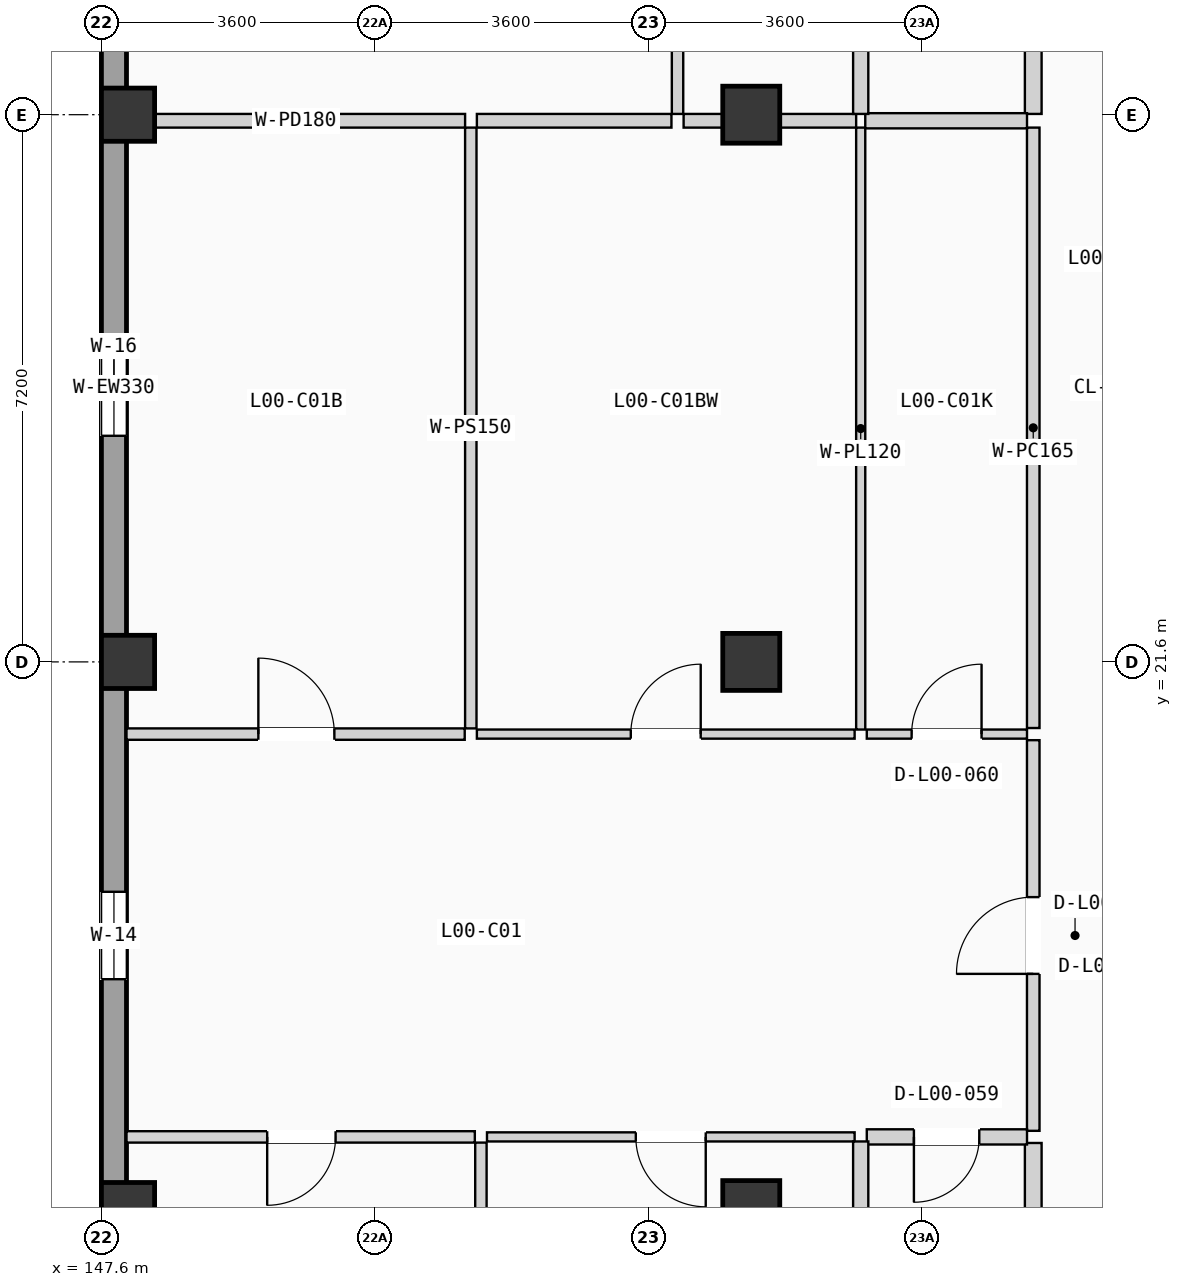
"""IFC4 building model, lengths in metres.
Left out: names, types, materials, properties, quantities, classifications, styles, units other than length and angle.
Written with IfcOpenShell. Run it as: python <this file> out.ifc"""

import sys

from ifc_helpers import new_model, si_unit, direction, frame, frame_2d, origin, origin_2d, place, context, subcontext, project, spatial, rectangle, extrude, element, fill, save


model = new_model("IFC4")
c1 = context("Model", 3, precision=1e-05, world=origin(), true_north=direction((0.0, 1.0)))
c2 = subcontext(c1, "Body", "Model", "MODEL_VIEW")
j1 = project(units=[si_unit("LENGTHUNIT", "METRE"), si_unit("PLANEANGLEUNIT", "RADIAN")], contexts=[c1])
p1 = place(None, origin())
s1 = spatial("IfcSite", under=j1, at=p1, CompositionType="ELEMENT")
p2 = place(p1, origin())
s2 = spatial("IfcBuilding", under=s1, at=p2, CompositionType="ELEMENT")
p3 = place(p2, origin())
s3 = spatial("IfcBuildingStorey", under=s2, at=p3, CompositionType="ELEMENT", Elevation=0.0)
for number, where, z_axis, x_axis in (
    (1, (147.95, 14.4, 0.0), (0.0, 0.0, 1.0), (1.0, 0.0, 0.0)),
    (2, (147.95, 21.6, 0.0), (0.0, 0.0, 1.0), (1.0, 0.0, 0.0)),
    (3, (147.95, 28.8, 0.0), (0.0, 0.0, 1.0), (1.0, 0.0, 0.0)),
):
    element("IfcColumn", number, at=place(p3, frame(where, z_axis=z_axis, x_axis=x_axis)), inside=s3, PredefinedType="COLUMN", context=c2, shape_type="SweptSolid", body=[
        extrude(rectangle(XDim=0.7, YDim=0.7, at=origin_2d()), origin(), (0.0, 0.0, 1.0), 4.9),
    ])
for number, where, z_axis, x_axis in (
    (4, (156.15, 14.4, 0.0), (0.0, 0.0, 1.0), (1.0, 0.0, 0.0)),
    (5, (156.15, 21.6, 0.0), (0.0, 0.0, 1.0), (1.0, 0.0, 0.0)),
    (6, (156.15, 28.8, 0.0), (0.0, 0.0, 1.0), (1.0, 0.0, 0.0)),
):
    element("IfcColumn", number, at=place(p3, frame(where, z_axis=z_axis, x_axis=x_axis)), inside=s3, PredefinedType="COLUMN", context=c2, shape_type="SweptSolid", body=[
        extrude(rectangle(XDim=0.75, YDim=0.75, at=origin_2d()), origin(), (0.0, 0.0, 1.0), 4.9),
    ])
p4 = place(p3, frame((147.765, 0.33, 0.0), z_axis=(0.0, 0.0, 1.0), x_axis=(0.0, 1.0, 0.0)))
e7 = element("IfcWall", 7, at=p4, inside=s3, PredefinedType="SOLIDWALL", context=c2, shape_type="SweptSolid", body=[
    extrude(rectangle(XDim=49.74, YDim=0.33, at=frame_2d((24.87, 0.0))), origin(), (0.0, 0.0, 1.0), 4.64),
])
p5 = place(p4, frame((17.095, 0.0, 0.9)))
e8 = element("IfcOpeningElement", 8, at=p5, cuts=e7, PredefinedType="OPENING", context=c2, shape_type="SweptSolid", body=[
    extrude(rectangle(XDim=1.15, YDim=1.65, at=frame_2d((0.575, 0.825))), frame((0.0, 0.175, 0.0), z_axis=(0.0, -1.0, 0.0), x_axis=(1.0, 0.0, 0.0)), (0.0, 0.0, 1.0), 0.35),
])
p6 = place(p4, frame((9.96, 0.0, 0.9)))
e9 = element("IfcOpeningElement", 9, at=p6, cuts=e7, PredefinedType="OPENING", context=c2, shape_type="SweptSolid", body=[
    extrude(rectangle(XDim=1.15, YDim=1.8, at=frame_2d((0.575, 0.9))), frame((0.0, 0.175, 0.0), z_axis=(0.0, -1.0, 0.0), x_axis=(1.0, 0.0, 0.0)), (0.0, 0.0, 1.0), 0.35),
])
p7 = place(p4, frame((24.245, 0.0, 0.9)))
e10 = element("IfcOpeningElement", 10, at=p7, cuts=e7, PredefinedType="OPENING", context=c2, shape_type="SweptSolid", body=[
    extrude(rectangle(XDim=1.25, YDim=1.2, at=frame_2d((0.625, 0.6))), frame((0.0, 0.175, 0.0), z_axis=(0.0, -1.0, 0.0), x_axis=(1.0, 0.0, 0.0)), (0.0, 0.0, 1.0), 0.35),
])
p8 = place(p4, frame((33.523, 0.0, 0.9)))
e11 = element("IfcOpeningElement", 11, at=p8, cuts=e7, PredefinedType="OPENING", context=c2, shape_type="SweptSolid", body=[
    extrude(rectangle(XDim=1.25, YDim=1.35, at=frame_2d((0.625, 0.675))), frame((0.0, 0.175, 0.0), z_axis=(0.0, -1.0, 0.0), x_axis=(1.0, 0.0, 0.0)), (0.0, 0.0, 1.0), 0.35),
])
p9 = place(p4, frame((30.114, 0.0, 0.9)))
e12 = element("IfcOpeningElement", 12, at=p9, cuts=e7, PredefinedType="OPENING", context=c2, shape_type="SweptSolid", body=[
    extrude(rectangle(XDim=1.25, YDim=1.5, at=frame_2d((0.625, 0.75))), frame((0.0, 0.175, 0.0), z_axis=(0.0, -1.0, 0.0), x_axis=(1.0, 0.0, 0.0)), (0.0, 0.0, 1.0), 0.35),
])
p10 = place(p4, frame((39.716, 0.0, 0.9)))
e13 = element("IfcOpeningElement", 13, at=p10, cuts=e7, PredefinedType="OPENING", context=c2, shape_type="SweptSolid", body=[
    extrude(rectangle(XDim=1.25, YDim=1.65, at=frame_2d((0.625, 0.825))), frame((0.0, 0.175, 0.0), z_axis=(0.0, -1.0, 0.0), x_axis=(1.0, 0.0, 0.0)), (0.0, 0.0, 1.0), 0.35),
])
p11 = place(p3, frame((159.86, 15.43, 0.0), z_axis=(0.0, 0.0, 1.0), x_axis=(0.0, 1.0, 0.0)))
e14 = element("IfcWall", 14, at=p11, inside=s3, PredefinedType="PARTITIONING", context=c2, shape_type="SweptSolid", body=[
    extrude(rectangle(XDim=5.14, YDim=0.165, at=frame_2d((2.57, 0.0))), origin(), (0.0, 0.0, 1.0), 3.84),
])
p12 = place(p11, frame((2.065, 0.0, 0.0)))
e15 = element("IfcOpeningElement", 15, at=p12, cuts=e14, PredefinedType="OPENING", context=c2, shape_type="SweptSolid", body=[
    extrude(rectangle(XDim=1.01, YDim=2.11, at=frame_2d((0.505, 1.055))), frame((0.0, 0.093, 0.0), z_axis=(0.0, -1.0, 0.0), x_axis=(1.0, 0.0, 0.0)), (0.0, 0.0, 1.0), 0.185),
])
p13 = place(p3, frame((159.86, 7.6, 0.0), z_axis=(0.0, 0.0, 1.0), x_axis=(0.0, 1.0, 0.0)))
e16 = element("IfcWall", 16, at=p13, inside=s3, PredefinedType="PLUMBINGWALL", context=c2, shape_type="SweptSolid", body=[
    extrude(rectangle(XDim=7.67, YDim=0.22, at=frame_2d((3.835, 0.0))), origin(), (0.0, 0.0, 1.0), 3.84),
])
p14 = place(p3, frame((159.86, 20.73, 0.0), z_axis=(0.0, 0.0, 1.0), x_axis=(0.0, 1.0, 0.0)))
e17 = element("IfcWall", 17, at=p14, inside=s3, PredefinedType="PARTITIONING", context=c2, shape_type="SweptSolid", body=[
    extrude(rectangle(XDim=7.9, YDim=0.165, at=frame_2d((3.95, 0.0))), origin(), (0.0, 0.0, 1.0), 3.84),
])
p15 = place(p3, frame((159.86, 28.81, 0.0), z_axis=(0.0, 0.0, 1.0), x_axis=(0.0, 1.0, 0.0)))
e18 = element("IfcWall", 18, at=p15, inside=s3, PredefinedType="PLUMBINGWALL", context=c2, shape_type="SweptSolid", body=[
    extrude(rectangle(XDim=4.257, YDim=0.22, at=frame_2d((2.128, 0.0))), origin(), (0.0, 0.0, 1.0), 3.84),
])
p16 = place(p3, frame((157.67, 15.35, 0.0), z_axis=(0.0, 0.0, 1.0), x_axis=(1.0, 0.0, 0.0)))
e19 = element("IfcWall", 19, at=p16, inside=s3, PredefinedType="PLUMBINGWALL", context=c2, shape_type="SweptSolid", body=[
    extrude(rectangle(XDim=2.108, YDim=0.2, at=frame_2d((1.054, 0.0))), origin(), (0.0, 0.0, 1.0), 3.84),
])
p17 = place(p16, frame((0.62, 0.0, 0.0)))
e20 = element("IfcOpeningElement", 20, at=p17, cuts=e19, PredefinedType="OPENING", context=c2, shape_type="SweptSolid", body=[
    extrude(rectangle(XDim=0.86, YDim=2.0, at=frame_2d((0.43, 1.0))), frame((0.0, 0.11, 0.0), z_axis=(0.0, -1.0, 0.0), x_axis=(1.0, 0.0, 0.0)), (0.0, 0.0, 1.0), 0.22),
])
p18 = place(p3, frame((157.67, 20.65, 0.0), z_axis=(0.0, 0.0, 1.0), x_axis=(1.0, 0.0, 0.0)))
e21 = element("IfcWall", 21, at=p18, inside=s3, PredefinedType="PARTITIONING", context=c2, shape_type="SweptSolid", body=[
    extrude(rectangle(XDim=2.108, YDim=0.12, at=frame_2d((1.054, 0.0))), origin(), (0.0, 0.0, 1.0), 3.84),
])
p19 = place(p18, frame((0.59, 0.0, 0.0)))
e22 = element("IfcOpeningElement", 22, at=p19, cuts=e21, PredefinedType="OPENING", context=c2, shape_type="SweptSolid", body=[
    extrude(rectangle(XDim=0.92, YDim=2.02, at=frame_2d((0.46, 1.01))), frame((0.0, 0.07, 0.0), z_axis=(0.0, -1.0, 0.0), x_axis=(1.0, 0.0, 0.0)), (0.0, 0.0, 1.0), 0.14),
])
p20 = place(p3, frame((147.93, 15.35, 0.0), z_axis=(0.0, 0.0, 1.0), x_axis=(1.0, 0.0, 0.0)))
e23 = element("IfcWall", 23, at=p20, inside=s3, PredefinedType="PARTITIONING", context=c2, shape_type="SweptSolid", body=[
    extrude(rectangle(XDim=4.583, YDim=0.15, at=frame_2d((2.292, 0.0))), origin(), (0.0, 0.0, 1.0), 3.84),
])
p21 = place(p20, frame((1.851, 0.0, 0.0)))
e24 = element("IfcOpeningElement", 24, at=p21, cuts=e23, PredefinedType="OPENING", context=c2, shape_type="SweptSolid", body=[
    extrude(rectangle(XDim=0.9, YDim=2.04, at=frame_2d((0.45, 1.02))), frame((0.0, 0.085, 0.0), z_axis=(0.0, -1.0, 0.0), x_axis=(1.0, 0.0, 0.0)), (0.0, 0.0, 1.0), 0.17),
])
p22 = place(p3, frame((152.673, 15.35, 0.0), z_axis=(0.0, 0.0, 1.0), x_axis=(1.0, 0.0, 0.0)))
e25 = element("IfcWall", 25, at=p22, inside=s3, PredefinedType="PARTITIONING", context=c2, shape_type="SweptSolid", body=[
    extrude(rectangle(XDim=4.837, YDim=0.12, at=frame_2d((2.418, 0.0))), origin(), (0.0, 0.0, 1.0), 3.84),
])
p23 = place(p22, frame((1.958, 0.0, 0.0)))
e26 = element("IfcOpeningElement", 26, at=p23, cuts=e25, PredefinedType="OPENING", context=c2, shape_type="SweptSolid", body=[
    extrude(rectangle(XDim=0.92, YDim=2.02, at=frame_2d((0.46, 1.01))), frame((0.0, 0.07, 0.0), z_axis=(0.0, -1.0, 0.0), x_axis=(1.0, 0.0, 0.0)), (0.0, 0.0, 1.0), 0.14),
])
p24 = place(p3, frame((147.93, 20.65, 0.0), z_axis=(0.0, 0.0, 1.0), x_axis=(1.0, 0.0, 0.0)))
e27 = element("IfcWall", 27, at=p24, inside=s3, PredefinedType="PARTITIONING", context=c2, shape_type="SweptSolid", body=[
    extrude(rectangle(XDim=4.45, YDim=0.15, at=frame_2d((2.225, 0.0))), origin(), (0.0, 0.0, 1.0), 3.84),
])
p25 = place(p24, frame((1.735, 0.0, 0.0)))
e28 = element("IfcOpeningElement", 28, at=p25, cuts=e27, PredefinedType="OPENING", context=c2, shape_type="SweptSolid", body=[
    extrude(rectangle(XDim=1.0, YDim=2.06, at=frame_2d((0.5, 1.03))), frame((0.0, 0.085, 0.0), z_axis=(0.0, -1.0, 0.0), x_axis=(1.0, 0.0, 0.0)), (0.0, 0.0, 1.0), 0.17),
])
p26 = place(p3, frame((152.54, 20.65, 0.0), z_axis=(0.0, 0.0, 1.0), x_axis=(1.0, 0.0, 0.0)))
e29 = element("IfcWall", 29, at=p26, inside=s3, PredefinedType="PARTITIONING", context=c2, shape_type="SweptSolid", body=[
    extrude(rectangle(XDim=4.97, YDim=0.12, at=frame_2d((2.485, 0.0))), origin(), (0.0, 0.0, 1.0), 3.84),
])
p27 = place(p26, frame((2.025, 0.0, 0.0)))
e30 = element("IfcOpeningElement", 30, at=p27, cuts=e29, PredefinedType="OPENING", context=c2, shape_type="SweptSolid", body=[
    extrude(rectangle(XDim=0.92, YDim=2.02, at=frame_2d((0.46, 1.01))), frame((0.0, 0.07, 0.0), z_axis=(0.0, -1.0, 0.0), x_axis=(1.0, 0.0, 0.0)), (0.0, 0.0, 1.0), 0.14),
])
p28 = place(p3, frame((157.59, 7.6, 0.0), z_axis=(0.0, 0.0, 1.0), x_axis=(0.0, 1.0, 0.0)))
e31 = element("IfcWall", 31, at=p28, inside=s3, PredefinedType="PLUMBINGWALL", context=c2, shape_type="SweptSolid", body=[
    extrude(rectangle(XDim=7.69, YDim=0.2, at=frame_2d((3.845, 0.0))), origin(), (0.0, 0.0, 1.0), 3.84),
])
p29 = place(p28, frame((3.41, 0.0, 0.0)))
e32 = element("IfcOpeningElement", 32, at=p29, cuts=e31, PredefinedType="OPENING", context=c2, shape_type="SweptSolid", body=[
    extrude(rectangle(XDim=0.85, YDim=2.01, at=frame_2d((0.425, 1.005))), frame((0.0, 0.11, 0.0), z_axis=(0.0, -1.0, 0.0), x_axis=(1.0, 0.0, 0.0)), (0.0, 0.0, 1.0), 0.22),
])
p30 = place(p3, frame((157.59, 20.71, 0.0), z_axis=(0.0, 0.0, 1.0), x_axis=(0.0, 1.0, 0.0)))
e33 = element("IfcWall", 33, at=p30, inside=s3, PredefinedType="PARTITIONING", context=c2, shape_type="SweptSolid", body=[
    extrude(rectangle(XDim=7.92, YDim=0.12, at=frame_2d((3.96, 0.0))), origin(), (0.0, 0.0, 1.0), 3.84),
])
p31 = place(p3, frame((157.65, 28.72, 0.0), z_axis=(0.0, 0.0, 1.0), x_axis=(1.0, 0.0, 0.0)))
e34 = element("IfcWall", 34, at=p31, inside=s3, PredefinedType="PLUMBINGWALL", context=c2, shape_type="SweptSolid", body=[
    extrude(rectangle(XDim=2.128, YDim=0.2, at=frame_2d((1.064, 0.0))), origin(), (0.0, 0.0, 1.0), 3.84),
])
p32 = place(p3, frame((152.593, 7.6, 0.0), z_axis=(0.0, 0.0, 1.0), x_axis=(0.0, 1.0, 0.0)))
e35 = element("IfcWall", 35, at=p32, inside=s3, PredefinedType="PARTITIONING", context=c2, shape_type="SweptSolid", body=[
    extrude(rectangle(XDim=7.675, YDim=0.15, at=frame_2d((3.837, 0.0))), origin(), (0.0, 0.0, 1.0), 3.84),
])
p33 = place(p3, frame((152.46, 20.725, 0.0), z_axis=(0.0, 0.0, 1.0), x_axis=(0.0, 1.0, 0.0)))
e36 = element("IfcWall", 36, at=p33, inside=s3, PredefinedType="PARTITIONING", context=c2, shape_type="SweptSolid", body=[
    extrude(rectangle(XDim=7.905, YDim=0.15, at=frame_2d((3.952, 0.0))), origin(), (0.0, 0.0, 1.0), 3.84),
])
p34 = place(p3, frame((147.93, 28.72, 0.0), z_axis=(0.0, 0.0, 1.0), x_axis=(1.0, 0.0, 0.0)))
e37 = element("IfcWall", 37, at=p34, inside=s3, PredefinedType="PARTITIONING", context=c2, shape_type="SweptSolid", body=[
    extrude(rectangle(XDim=4.455, YDim=0.18, at=frame_2d((2.228, 0.0))), origin(), (0.0, 0.0, 1.0), 3.84),
])
p35 = place(p3, frame((152.54, 28.72, 0.0), z_axis=(0.0, 0.0, 1.0), x_axis=(1.0, 0.0, 0.0)))
e38 = element("IfcWall", 38, at=p35, inside=s3, PredefinedType="PARTITIONING", context=c2, shape_type="SweptSolid", body=[
    extrude(rectangle(XDim=2.56, YDim=0.18, at=frame_2d((1.28, 0.0))), origin(), (0.0, 0.0, 1.0), 3.84),
])
p36 = place(p3, frame((155.26, 28.72, 0.0), z_axis=(0.0, 0.0, 1.0), x_axis=(1.0, 0.0, 0.0)))
e39 = element("IfcWall", 39, at=p36, inside=s3, PredefinedType="PARTITIONING", context=c2, shape_type="SweptSolid", body=[
    extrude(rectangle(XDim=2.27, YDim=0.18, at=frame_2d((1.135, 0.0))), origin(), (0.0, 0.0, 1.0), 3.84),
])
p37 = place(p3, frame((157.59, 28.81, 0.0), z_axis=(0.0, 0.0, 1.0), x_axis=(0.0, 1.0, 0.0)))
e40 = element("IfcWall", 40, at=p37, inside=s3, PredefinedType="PLUMBINGWALL", context=c2, shape_type="SweptSolid", body=[
    extrude(rectangle(XDim=4.277, YDim=0.2, at=frame_2d((2.138, 0.0))), origin(), (0.0, 0.0, 1.0), 3.84),
])
p38 = place(p37, frame((1.703, 0.0, 0.0)))
e41 = element("IfcOpeningElement", 41, at=p38, cuts=e40, PredefinedType="OPENING", context=c2, shape_type="SweptSolid", body=[
    extrude(rectangle(XDim=0.85, YDim=2.01, at=frame_2d((0.425, 1.005))), frame((0.0, 0.11, 0.0), z_axis=(0.0, -1.0, 0.0), x_axis=(1.0, 0.0, 0.0)), (0.0, 0.0, 1.0), 0.22),
])
p39 = place(p3, frame((155.18, 28.81, 0.0), z_axis=(0.0, 0.0, 1.0), x_axis=(0.0, 1.0, 0.0)))
e42 = element("IfcWall", 42, at=p39, inside=s3, PredefinedType="PARTITIONING", context=c2, shape_type="SweptSolid", body=[
    extrude(rectangle(XDim=4.277, YDim=0.15, at=frame_2d((2.138, 0.0))), origin(), (0.0, 0.0, 1.0), 3.84),
])
p40 = place(p5, origin())
e43 = element("IfcWindow", 43, at=p40, inside=s3, PartitioningType="SINGLE_PANEL", PredefinedType="WINDOW", context=c2, shape_type="SweptSolid", body=[
    extrude(rectangle(XDim=1.15, YDim=1.65, at=frame_2d((0.575, 0.825))), frame((0.0, 0.03, 0.0), z_axis=(0.0, -1.0, 0.0), x_axis=(1.0, 0.0, 0.0)), (0.0, 0.0, 1.0), 0.06),
])
fill(e8, e43)
p41 = place(p7, origin())
e44 = element("IfcWindow", 44, at=p41, inside=s3, PartitioningType="SINGLE_PANEL", PredefinedType="WINDOW", context=c2, shape_type="SweptSolid", body=[
    extrude(rectangle(XDim=1.25, YDim=1.2, at=frame_2d((0.625, 0.6))), frame((0.0, 0.03, 0.0), z_axis=(0.0, -1.0, 0.0), x_axis=(1.0, 0.0, 0.0)), (0.0, 0.0, 1.0), 0.06),
])
fill(e10, e44)
p42 = place(p12, origin())
e45 = element("IfcDoor", 45, at=p42, inside=s3, OperationType="SINGLE_SWING_LEFT", PredefinedType="DOOR", context=c2, shape_type="SweptSolid", body=[
    extrude(rectangle(XDim=1.01, YDim=2.11, at=frame_2d((0.505, 1.055))), frame((0.0, 0.025, 0.0), z_axis=(0.0, -1.0, 0.0), x_axis=(1.0, 0.0, 0.0)), (0.0, 0.0, 1.0), 0.05),
])
fill(e15, e45)
p43 = place(p17, frame((0.86, 0.0, 0.0), z_axis=(0.0, 0.0, 1.0), x_axis=(-1.0, 0.0, 0.0)))
e46 = element("IfcDoor", 46, at=p43, inside=s3, OperationType="SINGLE_SWING_LEFT", PredefinedType="DOOR", context=c2, shape_type="SweptSolid", body=[
    extrude(rectangle(XDim=0.86, YDim=2.0, at=frame_2d((0.43, 1.0))), frame((0.0, 0.025, 0.0), z_axis=(0.0, -1.0, 0.0), x_axis=(1.0, 0.0, 0.0)), (0.0, 0.0, 1.0), 0.05),
])
fill(e20, e46)
p44 = place(p19, origin())
e47 = element("IfcDoor", 47, at=p44, inside=s3, OperationType="SINGLE_SWING_RIGHT", PredefinedType="DOOR", context=c2, shape_type="SweptSolid", body=[
    extrude(rectangle(XDim=0.92, YDim=2.02, at=frame_2d((0.46, 1.01))), frame((0.0, 0.025, 0.0), z_axis=(0.0, -1.0, 0.0), x_axis=(1.0, 0.0, 0.0)), (0.0, 0.0, 1.0), 0.05),
])
fill(e22, e47)
p45 = place(p21, frame((0.9, 0.0, 0.0), z_axis=(0.0, 0.0, 1.0), x_axis=(-1.0, 0.0, 0.0)))
e48 = element("IfcDoor", 48, at=p45, inside=s3, OperationType="SINGLE_SWING_LEFT", PredefinedType="DOOR", context=c2, shape_type="SweptSolid", body=[
    extrude(rectangle(XDim=0.9, YDim=2.04, at=frame_2d((0.45, 1.02))), frame((0.0, 0.025, 0.0), z_axis=(0.0, -1.0, 0.0), x_axis=(1.0, 0.0, 0.0)), (0.0, 0.0, 1.0), 0.05),
])
fill(e24, e48)
p46 = place(p23, frame((0.92, 0.0, 0.0), z_axis=(0.0, 0.0, 1.0), x_axis=(-1.0, 0.0, 0.0)))
e49 = element("IfcDoor", 49, at=p46, inside=s3, OperationType="SINGLE_SWING_RIGHT", PredefinedType="DOOR", context=c2, shape_type="SweptSolid", body=[
    extrude(rectangle(XDim=0.92, YDim=2.02, at=frame_2d((0.46, 1.01))), frame((0.0, 0.025, 0.0), z_axis=(0.0, -1.0, 0.0), x_axis=(1.0, 0.0, 0.0)), (0.0, 0.0, 1.0), 0.05),
])
fill(e26, e49)
p47 = place(p25, origin())
e50 = element("IfcDoor", 50, at=p47, inside=s3, OperationType="SINGLE_SWING_LEFT", PredefinedType="DOOR", context=c2, shape_type="SweptSolid", body=[
    extrude(rectangle(XDim=1.0, YDim=2.06, at=frame_2d((0.5, 1.03))), frame((0.0, 0.025, 0.0), z_axis=(0.0, -1.0, 0.0), x_axis=(1.0, 0.0, 0.0)), (0.0, 0.0, 1.0), 0.05),
])
fill(e28, e50)
p48 = place(p27, origin())
e51 = element("IfcDoor", 51, at=p48, inside=s3, OperationType="SINGLE_SWING_RIGHT", PredefinedType="DOOR", context=c2, shape_type="SweptSolid", body=[
    extrude(rectangle(XDim=0.92, YDim=2.02, at=frame_2d((0.46, 1.01))), frame((0.0, 0.025, 0.0), z_axis=(0.0, -1.0, 0.0), x_axis=(1.0, 0.0, 0.0)), (0.0, 0.0, 1.0), 0.05),
])
fill(e30, e51)
save(model, sys.argv[1])
